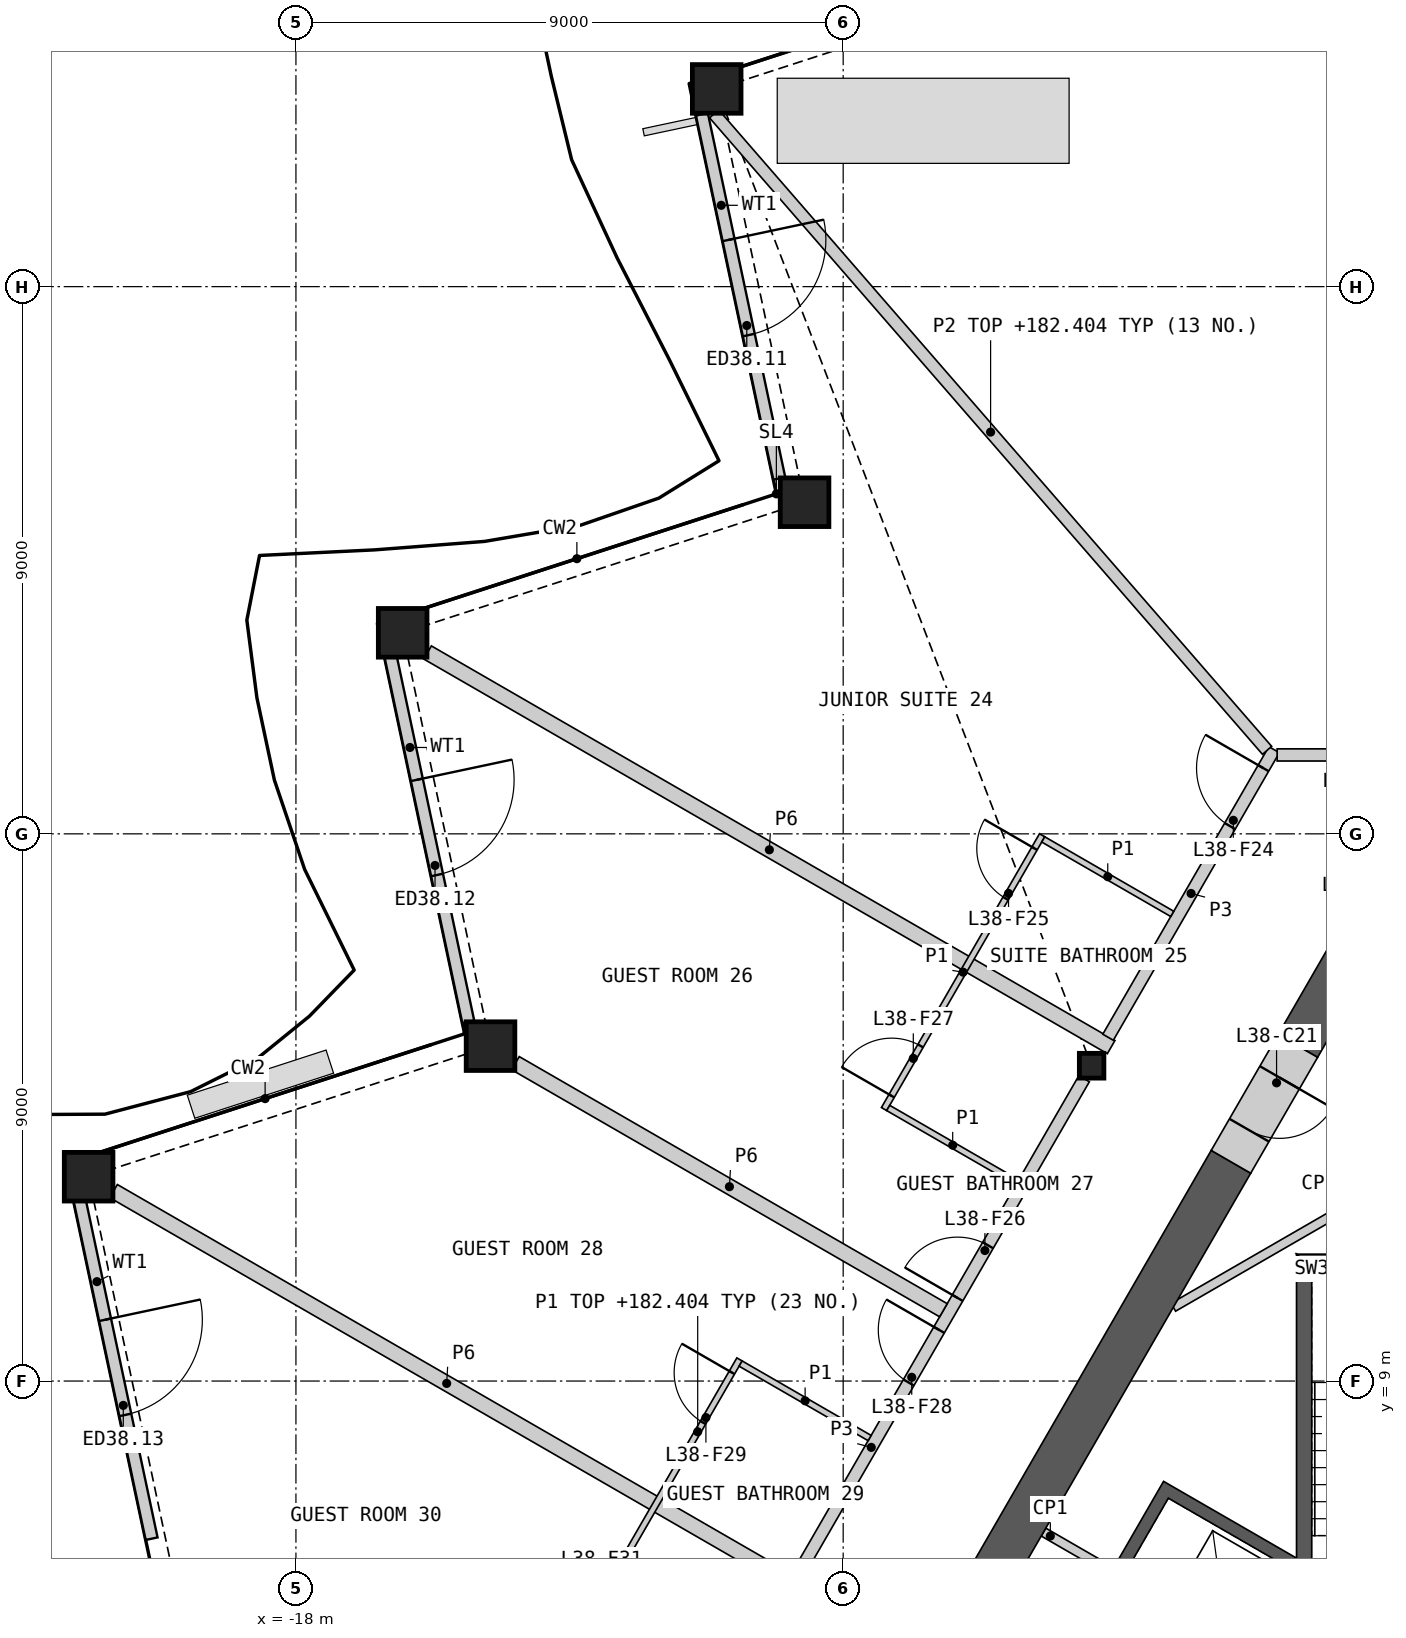
"""IFC4 building model, lengths in metres.
Left out: names, types, materials, properties, quantities, classifications, styles, units other than length and angle.
Written with IfcOpenShell. Run it as: python <this file> out.ifc"""

import sys

from ifc_helpers import new_model, si_unit, direction, frame, frame_2d, origin, origin_2d, place, context, subcontext, project, spatial, polyline, rectangle, hollow_rectangle, i_section, outline, extrude, element, fill, save


model = new_model("IFC4")
c1 = context("Model", 3, precision=1e-05, world=origin(), true_north=direction((0.0, 1.0)))
c2 = subcontext(c1, "Body", "Model", "MODEL_VIEW")
j1 = project(units=[si_unit("LENGTHUNIT", "METRE"), si_unit("PLANEANGLEUNIT", "RADIAN")], contexts=[c1])
p1 = place(None, origin())
s1 = spatial("IfcSite", under=j1, at=p1, CompositionType="ELEMENT")
p2 = place(p1, origin())
s2 = spatial("IfcBuilding", under=s1, at=p2, CompositionType="ELEMENT")
p3 = place(p2, frame((0.0, 0.0, 180.0)))
s3 = spatial("IfcBuildingStorey", under=s2, at=p3, CompositionType="ELEMENT", Elevation=180.0)
for number, where, z_axis, x_axis in (
    (1, (-11.08, 30.252, 0.0), (0.0, 0.0, 1.0), (1.0, 0.0, 0.0)),
    (2, (-9.635, 23.454, 0.0), (0.0, 0.0, 1.0), (1.0, 0.0, 0.0)),
    (3, (-16.245, 21.306, 0.0), (0.0, 0.0, 1.0), (1.0, 0.0, 0.0)),
    (4, (-14.8, 14.508, 0.0), (0.0, 0.0, 1.0), (1.0, 0.0, 0.0)),
    (5, (-21.409, 12.361, 0.0), (0.0, 0.0, 1.0), (1.0, 0.0, 0.0)),
):
    element("IfcColumn", number, at=place(p3, frame(where, z_axis=z_axis, x_axis=x_axis)), inside=s3, PredefinedType="COLUMN", context=c2, shape_type="SweptSolid", body=[
        extrude(hollow_rectangle(XDim=0.8, YDim=0.8, WallThickness=0.05, at=origin_2d()), origin(), (0.0, 0.0, 1.0), 3.6),
    ])
p4 = place(p3, frame((-4.914, 14.186, 0.0), z_axis=(0.0, 0.0, 1.0), x_axis=(1.0, 0.0, 0.0)))
e6 = element("IfcColumn", 6, at=p4, inside=s3, PredefinedType="COLUMN", context=c2, shape_type="SweptSolid", body=[
    extrude(i_section(OverallWidth=0.404, OverallDepth=0.407, WebThickness=0.027, FlangeThickness=0.044, at=origin_2d()), origin(), (0.0, 0.0, 1.0), 3.6),
])
p5 = place(p3, frame((-11.324, 29.835, 0.0), z_axis=(0.0, 0.0, 1.0), x_axis=(0.207925037413, -0.978144763732, 0.0)))
e7 = element("IfcWall", 7, at=p5, inside=s3, PredefinedType="SOLIDWALL", context=c2, shape_type="SweptSolid", body=[
    extrude(rectangle(XDim=6.123, YDim=0.2, at=frame_2d((3.062, 0.0))), origin(), (0.0, 0.0, 1.0), 2.701),
])
p6 = place(p5, frame((2.113, 0.0, 0.0)))
e8 = element("IfcOpeningElement", 8, at=p6, cuts=e7, PredefinedType="OPENING", context=c2, shape_type="SweptSolid", body=[
    extrude(rectangle(XDim=1.6, YDim=2.4, at=frame_2d((0.8, 1.2))), frame((0.0, 0.11, 0.0), z_axis=(0.0, -1.0, 0.0), x_axis=(1.0, 0.0, 0.0)), (0.0, 0.0, 1.0), 0.22),
])
p7 = place(p3, frame((-16.445, 20.925, 0.0), z_axis=(0.0, 0.0, 1.0), x_axis=(0.20791050027, -0.978147853792, 0.0)))
e9 = element("IfcWall", 9, at=p7, inside=s3, PredefinedType="SOLIDWALL", context=c2, shape_type="SweptSolid", body=[
    extrude(rectangle(XDim=6.151, YDim=0.2, at=frame_2d((3.075, 0.0))), origin(), (0.0, 0.0, 1.0), 2.701),
])
p8 = place(p7, frame((2.082, 0.0, 0.0)))
e10 = element("IfcOpeningElement", 10, at=p8, cuts=e9, PredefinedType="OPENING", context=c2, shape_type="SweptSolid", body=[
    extrude(rectangle(XDim=1.6, YDim=2.4, at=frame_2d((0.8, 1.2))), frame((0.0, 0.11, 0.0), z_axis=(0.0, -1.0, 0.0), x_axis=(1.0, 0.0, 0.0)), (0.0, 0.0, 1.0), 0.22),
])
p9 = place(p3, frame((-21.572, 12.044, 0.0), z_axis=(0.0, 0.0, 1.0), x_axis=(0.207914487103, -0.978147006361, 0.0)))
e11 = element("IfcWall", 11, at=p9, inside=s3, PredefinedType="SOLIDWALL", context=c2, shape_type="SweptSolid", body=[
    extrude(rectangle(XDim=5.763, YDim=0.2, at=frame_2d((2.882, 0.0))), origin(), (0.0, 0.0, 1.0), 2.701),
])
p10 = place(p9, frame((2.082, 0.0, 0.0)))
e12 = element("IfcOpeningElement", 12, at=p10, cuts=e11, PredefinedType="OPENING", context=c2, shape_type="SweptSolid", body=[
    extrude(rectangle(XDim=1.6, YDim=2.4, at=frame_2d((0.8, 1.2))), frame((0.0, 0.11, 0.0), z_axis=(0.0, -1.0, 0.0), x_axis=(1.0, 0.0, 0.0)), (0.0, 0.0, 1.0), 0.22),
])
p11 = place(p3, origin())
e13 = element("IfcWall", 13, at=p11, inside=s3, PredefinedType="SHEAR", context=c2, shape_type="SweptSolid", body=[
    extrude(outline(polyline([(-4.96, 0.208), (-7.131, 1.461), (-3.731, 7.35), (-1.561, 6.097), (-1.66, 5.924), (-3.652, 7.074), (-4.652, 5.342), (-2.66, 4.192), (-2.76, 4.019), (-4.752, 5.169), (-5.752, 3.437), (-3.76, 2.287), (-3.861, 2.113), (-5.852, 3.263), (-6.852, 1.531), (-4.861, 0.381), (-4.96, 0.208)])), origin(), (0.0, 0.0, 1.0), 3.25),
])
p12 = place(p3, origin())
e14 = element("IfcWall", 14, at=p12, inside=s3, PredefinedType="SHEAR", context=c2, shape_type="SweptSolid", body=[
    extrude(outline(polyline([(1.544, 11.087), (-1.544, 11.087), (-1.294, 10.837), (1.294, 10.837), (1.544, 11.087)])), origin(), (0.0, 0.0, 1.0), 3.25),
])
p13 = place(p3, origin())
e15 = element("IfcWall", 15, at=p13, inside=s3, PredefinedType="SHEAR", context=c2, shape_type="SweptSolid", body=[
    extrude(outline(polyline([(-1.294, 10.837), (-1.544, 11.087), (-1.544, 5.237), (-1.294, 5.237), (-1.294, 10.837)])), origin(), (0.0, 0.0, 1.0), 3.25),
])
p14 = place(p3, frame((-5.705, 6.516, 0.0), z_axis=(0.0, 0.0, 1.0), x_axis=(0.866003189247, -0.500038474733, 0.0)))
e16 = element("IfcWall", 16, at=p14, inside=s3, PredefinedType="PARTITIONING", context=c2, shape_type="SweptSolid", body=[
    extrude(rectangle(XDim=1.293, YDim=0.15, at=frame_2d((0.646, 0.0))), origin(), (0.0, 0.0, 1.0), 3.25),
])
p15 = place(p3, frame((1.785, 13.306, 0.0), z_axis=(0.0, 0.0, 1.0), x_axis=(-0.866038319186, -0.499977629202, 0.0)))
e17 = element("IfcWall", 17, at=p15, inside=s3, PredefinedType="PARTITIONING", context=c2, shape_type="SweptSolid", body=[
    extrude(rectangle(XDim=6.184, YDim=0.15, at=frame_2d((3.092, 0.0))), origin(), (0.0, 0.0, 1.0), 3.25),
])
p16 = place(p3, frame((-2.622, 12.606, 0.0), z_axis=(0.0, 0.0, 1.0), x_axis=(-0.500014611105, -0.866016967894, 0.0)))
e18 = element("IfcWall", 18, at=p16, inside=s3, PredefinedType="SHEAR", context=c2, shape_type="SweptSolid", body=[
    extrude(rectangle(XDim=8.198, YDim=0.75, at=frame_2d((4.099, 0.0))), origin(), (0.0, 0.0, 1.0), 3.25),
])
p17 = place(p3, frame((-0.325, 16.585, 0.0), z_axis=(0.0, 0.0, 1.0), x_axis=(-0.500019473932, -0.866014160212, 0.0)))
e19 = element("IfcWall", 19, at=p17, inside=s3, PredefinedType="SHEAR", context=c2, shape_type="SweptSolid", body=[
    extrude(rectangle(XDim=2.396, YDim=0.75, at=frame_2d((1.198, 0.0))), origin(), (0.0, 0.0, 1.0), 3.25),
])
p18 = place(p3, frame((-1.522, 14.511, 0.0), z_axis=(0.0, 0.0, 1.0), x_axis=(-0.499946605688, -0.86605622881, 0.0)))
e20 = element("IfcWall", 20, at=p18, inside=s3, PredefinedType="SHEAR", context=c2, shape_type="SweptSolid", body=[
    extrude(rectangle(XDim=2.2, YDim=0.75, at=frame_2d((1.1, 0.0))), origin(), (0.0, 0.0, 1.0), 3.25),
])
p19 = place(p18, frame((0.6, 0.0, 0.0)))
e21 = element("IfcOpeningElement", 21, at=p19, cuts=e20, PredefinedType="OPENING", context=c2, shape_type="SweptSolid", body=[
    extrude(rectangle(XDim=1.0, YDim=2.1, at=frame_2d((0.5, 1.05))), frame((0.0, 0.385, 0.0), z_axis=(0.0, -1.0, 0.0), x_axis=(1.0, 0.0, 0.0)), (0.0, 0.0, 1.0), 0.77),
])
p20 = place(p3, frame((-15.835, 20.983, 0.0), z_axis=(0.0, 0.0, 1.0), x_axis=(0.866022720283, -0.500004647933, 0.0)))
e22 = element("IfcWall", 22, at=p20, inside=s3, PredefinedType="PARTITIONING", context=c2, shape_type="SweptSolid", body=[
    extrude(rectangle(XDim=12.981, YDim=0.25, at=frame_2d((6.49, 0.0))), origin(), (0.0, 0.0, 1.0), 2.404),
])
p21 = place(p3, frame((-21.0, 12.124, 0.0), z_axis=(0.0, 0.0, 1.0), x_axis=(0.866025883649, -0.499999168849, 0.0)))
e23 = element("IfcWall", 23, at=p21, inside=s3, PredefinedType="PARTITIONING", context=c2, shape_type="SweptSolid", body=[
    extrude(rectangle(XDim=12.652, YDim=0.25, at=frame_2d((6.326, 0.0))), origin(), (0.0, 0.0, 1.0), 2.404),
])
p22 = place(p3, frame((-9.705, 5.888, 0.0), z_axis=(0.0, 0.0, 1.0), x_axis=(0.50000393355, 0.866023132736, 0.0)))
e24 = element("IfcWall", 24, at=p22, inside=s3, PredefinedType="PARTITIONING", context=c2, shape_type="SweptSolid", body=[
    extrude(rectangle(XDim=9.335, YDim=0.2, at=frame_2d((4.667, 0.0))), origin(), (0.0, 0.0, 1.0), 3.25),
])
p23 = place(p22, frame((5.172, 0.0, 0.0)))
e25 = element("IfcOpeningElement", 25, at=p23, cuts=e24, PredefinedType="OPENING", context=c2, shape_type="SweptSolid", body=[
    extrude(rectangle(XDim=1.0, YDim=2.1, at=frame_2d((0.5, 1.05))), frame((0.0, 0.11, 0.0), z_axis=(0.0, -1.0, 0.0), x_axis=(1.0, 0.0, 0.0)), (0.0, 0.0, 1.0), 0.22),
])
p24 = place(p22, frame((3.565, 0.0, 0.0)))
e26 = element("IfcOpeningElement", 26, at=p24, cuts=e24, PredefinedType="OPENING", context=c2, shape_type="SweptSolid", body=[
    extrude(rectangle(XDim=1.0, YDim=2.1, at=frame_2d((0.5, 1.05))), frame((0.0, 0.11, 0.0), z_axis=(0.0, -1.0, 0.0), x_axis=(1.0, 0.0, 0.0)), (0.0, 0.0, 1.0), 0.22),
])
p25 = place(p3, frame((-14.39, 14.228, 0.0), z_axis=(0.0, 0.0, 1.0), x_axis=(0.866031008936, -0.499990291468, 0.0)))
e27 = element("IfcWall", 27, at=p25, inside=s3, PredefinedType="PARTITIONING", context=c2, shape_type="SweptSolid", body=[
    extrude(rectangle(XDim=8.127, YDim=0.25, at=frame_2d((4.063, 0.0))), origin(), (0.0, 0.0, 1.0), 2.404),
])
p26 = place(p3, frame((-4.644, 14.655, 0.0), z_axis=(0.0, 0.0, 1.0), x_axis=(0.49998041698, 0.866036709751, 0.0)))
e28 = element("IfcWall", 28, at=p26, inside=s3, PredefinedType="PARTITIONING", context=c2, shape_type="SweptSolid", body=[
    extrude(rectangle(XDim=5.462, YDim=0.2, at=frame_2d((2.731, 0.0))), origin(), (0.0, 0.0, 1.0), 3.25),
])
p27 = place(p26, frame((4.01, 0.0, 0.0)))
e29 = element("IfcOpeningElement", 29, at=p27, cuts=e28, PredefinedType="OPENING", context=c2, shape_type="SweptSolid", body=[
    extrude(rectangle(XDim=1.1, YDim=2.1, at=frame_2d((0.55, 1.05))), frame((0.0, 0.11, 0.0), z_axis=(0.0, -1.0, 0.0), x_axis=(1.0, 0.0, 0.0)), (0.0, 0.0, 1.0), 0.22),
])
p28 = place(p3, frame((-1.863, 19.298, 0.0), z_axis=(0.0, 0.0, 1.0), x_axis=(1.0, 0.0, 0.0)))
e30 = element("IfcWall", 30, at=p28, inside=s3, PredefinedType="PARTITIONING", context=c2, shape_type="SweptSolid", body=[
    extrude(rectangle(XDim=3.826, YDim=0.2, at=frame_2d((1.913, 0.0))), origin(), (0.0, 0.0, 1.0), 3.25),
])
p29 = place(p28, frame((0.962, 0.0, 0.0)))
e31 = element("IfcOpeningElement", 31, at=p29, cuts=e30, PredefinedType="OPENING", context=c2, shape_type="SweptSolid", body=[
    extrude(rectangle(XDim=1.8, YDim=2.1, at=frame_2d((0.9, 1.05))), frame((0.0, 0.11, 0.0), z_axis=(0.0, -1.0, 0.0), x_axis=(1.0, 0.0, 0.0)), (0.0, 0.0, 1.0), 0.22),
])
p30 = place(p3, frame((-11.122, 29.842, 0.0), z_axis=(0.0, 0.0, 1.0), x_axis=(0.65579678992, -0.754937461205, 0.0)))
e32 = element("IfcWall", 32, at=p30, inside=s3, PredefinedType="PARTITIONING", context=c2, shape_type="SweptSolid", body=[
    extrude(rectangle(XDim=13.867, YDim=0.2, at=frame_2d((6.933, 0.0))), origin(), (0.0, 0.0, 1.0), 2.404),
])
p31 = place(p3, frame((-13.455, 4.593, 0.0), z_axis=(0.0, 0.0, 1.0), x_axis=(0.500015767406, 0.866016300277, 0.0)))
e33 = element("IfcWall", 33, at=p31, inside=s3, PredefinedType="PARTITIONING", context=c2, shape_type="SweptSolid", body=[
    extrude(rectangle(XDim=5.5, YDim=0.1, at=frame_2d((2.75, 0.0))), origin(), (0.0, 0.0, 1.0), 2.404),
])
p32 = place(p31, frame((4.3, 0.0, 0.0)))
e34 = element("IfcOpeningElement", 34, at=p32, cuts=e33, PredefinedType="OPENING", context=c2, shape_type="SweptSolid", body=[
    extrude(rectangle(XDim=0.95, YDim=2.1, at=frame_2d((0.475, 1.05))), frame((0.0, 0.06, 0.0), z_axis=(0.0, -1.0, 0.0), x_axis=(1.0, 0.0, 0.0)), (0.0, 0.0, 1.0), 0.12),
])
p33 = place(p31, frame((0.25, 0.0, 0.0)))
e35 = element("IfcOpeningElement", 35, at=p33, cuts=e33, PredefinedType="OPENING", context=c2, shape_type="SweptSolid", body=[
    extrude(rectangle(XDim=0.95, YDim=2.1, at=frame_2d((0.475, 1.05))), frame((0.0, 0.06, 0.0), z_axis=(0.0, -1.0, 0.0), x_axis=(1.0, 0.0, 0.0)), (0.0, 0.0, 1.0), 0.12),
])
p34 = place(p3, frame((-8.328, 13.473, 0.0), z_axis=(0.0, 0.0, 1.0), x_axis=(0.499992051641, 0.866029992723, 0.0)))
e36 = element("IfcWall", 36, at=p34, inside=s3, PredefinedType="PARTITIONING", context=c2, shape_type="SweptSolid", body=[
    extrude(rectangle(XDim=5.2, YDim=0.1, at=frame_2d((2.6, 0.0))), origin(), (0.0, 0.0, 1.0), 2.404),
])
p35 = place(p34, frame((4.0, 0.0, 0.0)))
e37 = element("IfcOpeningElement", 37, at=p35, cuts=e36, PredefinedType="OPENING", context=c2, shape_type="SweptSolid", body=[
    extrude(rectangle(XDim=0.95, YDim=2.1, at=frame_2d((0.475, 1.05))), frame((0.0, 0.06, 0.0), z_axis=(0.0, -1.0, 0.0), x_axis=(1.0, 0.0, 0.0)), (0.0, 0.0, 1.0), 0.12),
])
p36 = place(p34, frame((0.25, 0.0, 0.0)))
e38 = element("IfcOpeningElement", 38, at=p36, cuts=e36, PredefinedType="OPENING", context=c2, shape_type="SweptSolid", body=[
    extrude(rectangle(XDim=0.95, YDim=2.1, at=frame_2d((0.475, 1.05))), frame((0.0, 0.06, 0.0), z_axis=(0.0, -1.0, 0.0), x_axis=(1.0, 0.0, 0.0)), (0.0, 0.0, 1.0), 0.12),
])
p37 = place(p3, frame((-5.71, 17.908, 0.0), z_axis=(0.0, 0.0, 1.0), x_axis=(0.866057815567, -0.499943856944, 0.0)))
e39 = element("IfcWall", 39, at=p37, inside=s3, PredefinedType="PARTITIONING", context=c2, shape_type="SweptSolid", body=[
    extrude(rectangle(XDim=2.45, YDim=0.1, at=frame_2d((1.225, 0.0))), origin(), (0.0, 0.0, 1.0), 2.404),
])
p38 = place(p3, frame((-8.26, 13.492, 0.0), z_axis=(0.0, 0.0, 1.0), x_axis=(0.866014668023, -0.500018594424, 0.0)))
e40 = element("IfcWall", 40, at=p38, inside=s3, PredefinedType="PARTITIONING", context=c2, shape_type="SweptSolid", body=[
    extrude(rectangle(XDim=2.45, YDim=0.1, at=frame_2d((1.225, 0.0))), origin(), (0.0, 0.0, 1.0), 2.404),
])
p39 = place(p3, frame((-10.687, 9.288, 0.0), z_axis=(0.0, 0.0, 1.0), x_axis=(0.866032905446, -0.499987006516, 0.0)))
e41 = element("IfcWall", 41, at=p39, inside=s3, PredefinedType="PARTITIONING", context=c2, shape_type="SweptSolid", body=[
    extrude(rectangle(XDim=2.45, YDim=0.1, at=frame_2d((1.225, 0.0))), origin(), (0.0, 0.0, 1.0), 2.404),
])
p40 = place(p6, origin())
e42 = element("IfcDoor", 42, at=p40, inside=s3, OperationType="DOUBLE_DOOR_SINGLE_SWING", PredefinedType="DOOR", context=c2, shape_type="SweptSolid", body=[
    extrude(rectangle(XDim=1.6, YDim=2.4, at=frame_2d((0.8, 1.2))), frame((0.0, 0.025, 0.0), z_axis=(0.0, -1.0, 0.0), x_axis=(1.0, 0.0, 0.0)), (0.0, 0.0, 1.0), 0.05),
])
fill(e8, e42)
p41 = place(p8, origin())
e43 = element("IfcDoor", 43, at=p41, inside=s3, OperationType="DOUBLE_DOOR_SINGLE_SWING", PredefinedType="DOOR", context=c2, shape_type="SweptSolid", body=[
    extrude(rectangle(XDim=1.6, YDim=2.4, at=frame_2d((0.8, 1.2))), frame((0.0, 0.025, 0.0), z_axis=(0.0, -1.0, 0.0), x_axis=(1.0, 0.0, 0.0)), (0.0, 0.0, 1.0), 0.05),
])
fill(e10, e43)
p42 = place(p10, origin())
e44 = element("IfcDoor", 44, at=p42, inside=s3, OperationType="DOUBLE_DOOR_SINGLE_SWING", PredefinedType="DOOR", context=c2, shape_type="SweptSolid", body=[
    extrude(rectangle(XDim=1.6, YDim=2.4, at=frame_2d((0.8, 1.2))), frame((0.0, 0.025, 0.0), z_axis=(0.0, -1.0, 0.0), x_axis=(1.0, 0.0, 0.0)), (0.0, 0.0, 1.0), 0.05),
])
fill(e12, e44)
p43 = place(p19, origin())
e45 = element("IfcDoor", 45, at=p43, inside=s3, OperationType="SINGLE_SWING_LEFT", PredefinedType="DOOR", context=c2, shape_type="SweptSolid", body=[
    extrude(rectangle(XDim=1.0, YDim=2.1, at=frame_2d((0.5, 1.05))), frame((0.0, 0.13, 0.0), z_axis=(0.0, -1.0, 0.0), x_axis=(1.0, 0.0, 0.0)), (0.0, 0.0, 1.0), 0.05),
])
fill(e21, e45)
p44 = place(p27, origin())
e46 = element("IfcDoor", 46, at=p44, inside=s3, OperationType="SINGLE_SWING_RIGHT", PredefinedType="DOOR", context=c2, shape_type="SweptSolid", body=[
    extrude(rectangle(XDim=1.1, YDim=2.1, at=frame_2d((0.55, 1.05))), frame((0.0, 0.025, 0.0), z_axis=(0.0, -1.0, 0.0), x_axis=(1.0, 0.0, 0.0)), (0.0, 0.0, 1.0), 0.05),
])
fill(e29, e46)
p45 = place(p35, origin())
e47 = element("IfcDoor", 47, at=p45, inside=s3, OperationType="SINGLE_SWING_RIGHT", PredefinedType="DOOR", context=c2, shape_type="SweptSolid", body=[
    extrude(rectangle(XDim=0.95, YDim=2.1, at=frame_2d((0.475, 1.05))), frame((0.0, 0.025, 0.0), z_axis=(0.0, -1.0, 0.0), x_axis=(1.0, 0.0, 0.0)), (0.0, 0.0, 1.0), 0.05),
])
fill(e37, e47)
p46 = place(p23, origin())
e48 = element("IfcDoor", 48, at=p46, inside=s3, OperationType="SINGLE_SWING_LEFT", PredefinedType="DOOR", context=c2, shape_type="SweptSolid", body=[
    extrude(rectangle(XDim=1.0, YDim=2.1, at=frame_2d((0.5, 1.05))), frame((0.0, 0.025, 0.0), z_axis=(0.0, -1.0, 0.0), x_axis=(1.0, 0.0, 0.0)), (0.0, 0.0, 1.0), 0.05),
])
fill(e25, e48)
p47 = place(p36, origin())
e49 = element("IfcDoor", 49, at=p47, inside=s3, OperationType="SINGLE_SWING_LEFT", PredefinedType="DOOR", context=c2, shape_type="SweptSolid", body=[
    extrude(rectangle(XDim=0.95, YDim=2.1, at=frame_2d((0.475, 1.05))), frame((0.0, 0.025, 0.0), z_axis=(0.0, -1.0, 0.0), x_axis=(1.0, 0.0, 0.0)), (0.0, 0.0, 1.0), 0.05),
])
fill(e38, e49)
p48 = place(p24, origin())
e50 = element("IfcDoor", 50, at=p48, inside=s3, OperationType="SINGLE_SWING_RIGHT", PredefinedType="DOOR", context=c2, shape_type="SweptSolid", body=[
    extrude(rectangle(XDim=1.0, YDim=2.1, at=frame_2d((0.5, 1.05))), frame((0.0, 0.025, 0.0), z_axis=(0.0, -1.0, 0.0), x_axis=(1.0, 0.0, 0.0)), (0.0, 0.0, 1.0), 0.05),
])
fill(e26, e50)
p49 = place(p32, origin())
e51 = element("IfcDoor", 51, at=p49, inside=s3, OperationType="SINGLE_SWING_RIGHT", PredefinedType="DOOR", context=c2, shape_type="SweptSolid", body=[
    extrude(rectangle(XDim=0.95, YDim=2.1, at=frame_2d((0.475, 1.05))), frame((0.0, 0.025, 0.0), z_axis=(0.0, -1.0, 0.0), x_axis=(1.0, 0.0, 0.0)), (0.0, 0.0, 1.0), 0.05),
])
fill(e34, e51)
save(model, sys.argv[1])
